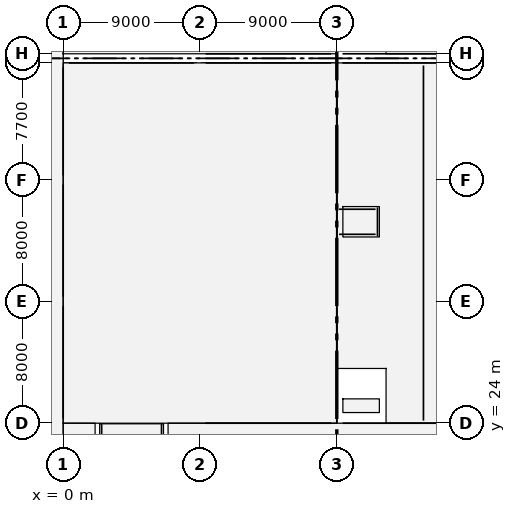
"""IFC4 building model, lengths in metres.
Left out: names, types, materials, properties, quantities, classifications, styles, units other than length and angle.
Written with IfcOpenShell. Run it as: python <this file> out.ifc"""

import sys

from ifc_helpers import new_model, si_unit, direction, frame, frame_2d, origin, origin_2d, place, context, subcontext, project, spatial, rectangle, extrude, element, fill, save


model = new_model("IFC4")
c1 = context("Model", 3, precision=1e-05, world=origin(), true_north=direction((0.0, 1.0)))
c2 = subcontext(c1, "Body", "Model", "MODEL_VIEW")
j1 = project(units=[si_unit("LENGTHUNIT", "METRE"), si_unit("PLANEANGLEUNIT", "RADIAN")], contexts=[c1])
p1 = place(None, origin())
s1 = spatial("IfcSite", under=j1, at=p1, CompositionType="ELEMENT")
p2 = place(p1, origin())
s2 = spatial("IfcBuilding", under=s1, at=p2, CompositionType="ELEMENT")
p3 = place(p2, origin())
s3 = spatial("IfcBuildingStorey", under=s2, at=p3, CompositionType="ELEMENT", Elevation=0.0)
p4 = place(p3, frame((18.0, 24.0, -0.5), z_axis=(0.0, 0.0, 1.0), x_axis=(0.0, 1.0, 0.0)))
e1 = element("IfcWall", 1, at=p4, inside=s3, PredefinedType="SOLIDWALL", context=c2, shape_type="SweptSolid", body=[
    extrude(rectangle(XDim=23.7, YDim=0.3, at=frame_2d((11.85, 0.0))), origin(), (0.0, 0.0, 1.0), 1.725),
])
p5 = place(p3, frame((18.0, 48.3, -0.5), z_axis=(0.0, 0.0, 1.0), x_axis=(0.0, 1.0, 0.0)))
e2 = element("IfcWall", 2, at=p5, inside=s3, PredefinedType="SOLIDWALL", context=c2, shape_type="SweptSolid", body=[
    extrude(rectangle(XDim=47.4, YDim=0.3, at=frame_2d((23.7, 0.0))), origin(), (0.0, 0.0, 1.0), 1.725),
])
for number, where, z_axis, x_axis in (
    (3, (0.0, 24.0, -0.5), (0.0, 0.0, 1.0), (1.0, 0.0, 0.0)),
    (4, (0.0, 32.0, -0.5), (0.0, 0.0, 1.0), (1.0, 0.0, 0.0)),
    (5, (0.0, 40.0, -0.5), (0.0, 0.0, 1.0), (1.0, 0.0, 0.0)),
):
    element("IfcColumn", number, at=place(p3, frame(where, z_axis=z_axis, x_axis=x_axis)), inside=s3, PredefinedType="COLUMN", context=c2, shape_type="SweptSolid", body=[
        extrude(rectangle(XDim=0.7, YDim=0.6, at=origin_2d()), origin(), (0.0, 0.0, 1.0), 7.3),
    ])
for number, where, z_axis, x_axis in (
    (6, (0.0, 47.7, -0.5), (0.0, 0.0, 1.0), (1.0, 0.0, 0.0)),
    (7, (0.0, 48.3, -0.5), (0.0, 0.0, 1.0), (1.0, 0.0, 0.0)),
):
    element("IfcColumn", number, at=place(p3, frame(where, z_axis=z_axis, x_axis=x_axis)), inside=s3, PredefinedType="COLUMN", context=c2, shape_type="SweptSolid", body=[
        extrude(rectangle(XDim=0.75, YDim=0.55, at=origin_2d()), origin(), (0.0, 0.0, 1.0), 7.3),
    ])
for number, where, z_axis, x_axis in (
    (8, (9.0, 24.0, -0.5), (0.0, 0.0, 1.0), (1.0, 0.0, 0.0)),
    (9, (9.0, 32.0, -0.5), (0.0, 0.0, 1.0), (1.0, 0.0, 0.0)),
    (10, (9.0, 40.0, -0.5), (0.0, 0.0, 1.0), (1.0, 0.0, 0.0)),
):
    element("IfcColumn", number, at=place(p3, frame(where, z_axis=z_axis, x_axis=x_axis)), inside=s3, PredefinedType="COLUMN", context=c2, shape_type="SweptSolid", body=[
        extrude(rectangle(XDim=0.7, YDim=0.6, at=origin_2d()), origin(), (0.0, 0.0, 1.0), 7.3),
    ])
for number, where, z_axis, x_axis in (
    (11, (9.0, 47.7, -0.5), (0.0, 0.0, 1.0), (1.0, 0.0, 0.0)),
    (12, (9.0, 48.3, -0.5), (0.0, 0.0, 1.0), (1.0, 0.0, 0.0)),
):
    element("IfcColumn", number, at=place(p3, frame(where, z_axis=z_axis, x_axis=x_axis)), inside=s3, PredefinedType="COLUMN", context=c2, shape_type="SweptSolid", body=[
        extrude(rectangle(XDim=0.75, YDim=0.55, at=origin_2d()), origin(), (0.0, 0.0, 1.0), 7.3),
    ])
for number, where, z_axis, x_axis in (
    (13, (18.0, 24.0, -0.5), (0.0, 0.0, 1.0), (1.0, 0.0, 0.0)),
    (14, (18.0, 32.0, -0.5), (0.0, 0.0, 1.0), (1.0, 0.0, 0.0)),
    (15, (18.0, 40.0, -0.5), (0.0, 0.0, 1.0), (1.0, 0.0, 0.0)),
):
    element("IfcColumn", number, at=place(p3, frame(where, z_axis=z_axis, x_axis=x_axis)), inside=s3, PredefinedType="COLUMN", context=c2, shape_type="SweptSolid", body=[
        extrude(rectangle(XDim=0.75, YDim=0.75, at=origin_2d()), origin(), (0.0, 0.0, 1.0), 6.8),
    ])
for number, where, z_axis, x_axis in (
    (16, (18.0, 47.7, -0.5), (0.0, 0.0, 1.0), (1.0, 0.0, 0.0)),
    (17, (18.0, 48.3, -0.5), (0.0, 0.0, 1.0), (1.0, 0.0, 0.0)),
):
    element("IfcColumn", number, at=place(p3, frame(where, z_axis=z_axis, x_axis=x_axis)), inside=s3, PredefinedType="COLUMN", context=c2, shape_type="SweptSolid", body=[
        extrude(rectangle(XDim=0.75, YDim=0.55, at=origin_2d()), origin(), (0.0, 0.0, 1.0), 6.8),
    ])
p6 = place(p3, frame((9.35, 24.0, 1.225), z_axis=(0.0, 0.0, 1.0), x_axis=(1.0, 0.0, 0.0)))
e18 = element("IfcWall", 18, at=p6, inside=s3, PredefinedType="SOLIDWALL", context=c2, shape_type="SweptSolid", body=[
    extrude(rectangle(XDim=8.275, YDim=0.32, at=frame_2d((4.137, 0.0))), origin(), (0.0, 0.0, 1.0), 3.875),
])
p7 = place(p6, frame((1.858, 0.0, 0.685)))
e19 = element("IfcOpeningElement", 19, at=p7, cuts=e18, PredefinedType="OPENING", context=c2, shape_type="SweptSolid", body=[
    extrude(rectangle(XDim=1.8, YDim=3.15, at=frame_2d((0.9, 1.575))), frame((0.0, 0.17, 0.0), z_axis=(0.0, -1.0, 0.0), x_axis=(1.0, 0.0, 0.0)), (0.0, 0.0, 1.0), 0.34),
])
p8 = place(p6, frame((4.617, 0.0, 0.685)))
e20 = element("IfcOpeningElement", 20, at=p8, cuts=e18, PredefinedType="OPENING", context=c2, shape_type="SweptSolid", body=[
    extrude(rectangle(XDim=1.8, YDim=3.15, at=frame_2d((0.9, 1.575))), frame((0.0, 0.17, 0.0), z_axis=(0.0, -1.0, 0.0), x_axis=(1.0, 0.0, 0.0)), (0.0, 0.0, 1.0), 0.34),
])
p9 = place(p3, frame((0.375, 47.7, 1.225), z_axis=(0.0, 0.0, 1.0), x_axis=(1.0, 0.0, 0.0)))
e21 = element("IfcWall", 21, at=p9, inside=s3, PredefinedType="SOLIDWALL", context=c2, shape_type="SweptSolid", body=[
    extrude(rectangle(XDim=8.25, YDim=0.32, at=frame_2d((4.125, 0.0))), origin(), (0.0, 0.0, 1.0), 4.515),
])
p10 = place(p9, frame((1.85, 0.0, 0.85)))
e22 = element("IfcOpeningElement", 22, at=p10, cuts=e21, PredefinedType="OPENING", context=c2, shape_type="SweptSolid", body=[
    extrude(rectangle(XDim=1.8, YDim=3.15, at=frame_2d((0.9, 1.575))), frame((0.0, 0.17, 0.0), z_axis=(0.0, -1.0, 0.0), x_axis=(1.0, 0.0, 0.0)), (0.0, 0.0, 1.0), 0.34),
])
p11 = place(p9, frame((4.6, 0.0, 0.85)))
e23 = element("IfcOpeningElement", 23, at=p11, cuts=e21, PredefinedType="OPENING", context=c2, shape_type="SweptSolid", body=[
    extrude(rectangle(XDim=1.8, YDim=3.15, at=frame_2d((0.9, 1.575))), frame((0.0, 0.17, 0.0), z_axis=(0.0, -1.0, 0.0), x_axis=(1.0, 0.0, 0.0)), (0.0, 0.0, 1.0), 0.34),
])
p12 = place(p3, frame((9.375, 47.7, 1.225), z_axis=(0.0, 0.0, 1.0), x_axis=(1.0, 0.0, 0.0)))
e24 = element("IfcWall", 24, at=p12, inside=s3, PredefinedType="SOLIDWALL", context=c2, shape_type="SweptSolid", body=[
    extrude(rectangle(XDim=8.25, YDim=0.32, at=frame_2d((4.125, 0.0))), origin(), (0.0, 0.0, 1.0), 3.875),
])
p13 = place(p12, frame((1.85, 0.0, 0.685)))
e25 = element("IfcOpeningElement", 25, at=p13, cuts=e24, PredefinedType="OPENING", context=c2, shape_type="SweptSolid", body=[
    extrude(rectangle(XDim=1.8, YDim=3.15, at=frame_2d((0.9, 1.575))), frame((0.0, 0.17, 0.0), z_axis=(0.0, -1.0, 0.0), x_axis=(1.0, 0.0, 0.0)), (0.0, 0.0, 1.0), 0.34),
])
p14 = place(p12, frame((4.6, 0.0, 0.685)))
e26 = element("IfcOpeningElement", 26, at=p14, cuts=e24, PredefinedType="OPENING", context=c2, shape_type="SweptSolid", body=[
    extrude(rectangle(XDim=1.8, YDim=3.15, at=frame_2d((0.9, 1.575))), frame((0.0, 0.17, 0.0), z_axis=(0.0, -1.0, 0.0), x_axis=(1.0, 0.0, 0.0)), (0.0, 0.0, 1.0), 0.34),
])
p15 = place(p3, frame((0.0, 24.3, 1.225), z_axis=(0.0, 0.0, 1.0), x_axis=(0.0, 1.0, 0.0)))
e27 = element("IfcWall", 27, at=p15, inside=s3, PredefinedType="SOLIDWALL", context=c2, shape_type="SweptSolid", body=[
    extrude(rectangle(XDim=7.4, YDim=0.32, at=frame_2d((3.7, 0.0))), origin(), (0.0, 0.0, 1.0), 4.515),
])
p16 = place(p15, frame((1.184, 0.0, 0.0)))
e28 = element("IfcOpeningElement", 28, at=p16, cuts=e27, PredefinedType="OPENING", context=c2, shape_type="SweptSolid", body=[
    extrude(rectangle(XDim=3.2, YDim=3.6, at=frame_2d((1.6, 1.8))), frame((0.0, 0.17, 0.0), z_axis=(0.0, -1.0, 0.0), x_axis=(1.0, 0.0, 0.0)), (0.0, 0.0, 1.0), 0.34),
])
p17 = place(p3, frame((0.0, 32.3, 1.225), z_axis=(0.0, 0.0, 1.0), x_axis=(0.0, 1.0, 0.0)))
e29 = element("IfcWall", 29, at=p17, inside=s3, PredefinedType="SOLIDWALL", context=c2, shape_type="SweptSolid", body=[
    extrude(rectangle(XDim=7.4, YDim=0.32, at=frame_2d((3.7, 0.0))), origin(), (0.0, 0.0, 1.0), 4.515),
])
p18 = place(p17, frame((1.184, 0.0, 0.0)))
e30 = element("IfcOpeningElement", 30, at=p18, cuts=e29, PredefinedType="OPENING", context=c2, shape_type="SweptSolid", body=[
    extrude(rectangle(XDim=3.2, YDim=3.6, at=frame_2d((1.6, 1.8))), frame((0.0, 0.17, 0.0), z_axis=(0.0, -1.0, 0.0), x_axis=(1.0, 0.0, 0.0)), (0.0, 0.0, 1.0), 0.34),
])
p19 = place(p3, frame((0.0, 40.3, 1.225), z_axis=(0.0, 0.0, 1.0), x_axis=(0.0, 1.0, 0.0)))
e31 = element("IfcWall", 31, at=p19, inside=s3, PredefinedType="SOLIDWALL", context=c2, shape_type="SweptSolid", body=[
    extrude(rectangle(XDim=7.125, YDim=0.32, at=frame_2d((3.562, 0.0))), origin(), (0.0, 0.0, 1.0), 4.515),
])
p20 = place(p19, frame((1.14, 0.0, 0.0)))
e32 = element("IfcOpeningElement", 32, at=p20, cuts=e31, PredefinedType="OPENING", context=c2, shape_type="SweptSolid", body=[
    extrude(rectangle(XDim=3.2, YDim=3.6, at=frame_2d((1.6, 1.8))), frame((0.0, 0.17, 0.0), z_axis=(0.0, -1.0, 0.0), x_axis=(1.0, 0.0, 0.0)), (0.0, 0.0, 1.0), 0.34),
])
p21 = place(p3, frame((9.375, 48.3, 1.225), z_axis=(0.0, 0.0, 1.0), x_axis=(1.0, 0.0, 0.0)))
e33 = element("IfcWall", 33, at=p21, inside=s3, PredefinedType="SOLIDWALL", context=c2, shape_type="SweptSolid", body=[
    extrude(rectangle(XDim=8.25, YDim=0.32, at=frame_2d((4.125, 0.0))), origin(), (0.0, 0.0, 1.0), 3.875),
])
p22 = place(p21, frame((1.85, 0.0, 0.685)))
e34 = element("IfcOpeningElement", 34, at=p22, cuts=e33, PredefinedType="OPENING", context=c2, shape_type="SweptSolid", body=[
    extrude(rectangle(XDim=1.8, YDim=3.15, at=frame_2d((0.9, 1.575))), frame((0.0, 0.17, 0.0), z_axis=(0.0, -1.0, 0.0), x_axis=(1.0, 0.0, 0.0)), (0.0, 0.0, 1.0), 0.34),
])
p23 = place(p21, frame((4.6, 0.0, 0.685)))
e35 = element("IfcOpeningElement", 35, at=p23, cuts=e33, PredefinedType="OPENING", context=c2, shape_type="SweptSolid", body=[
    extrude(rectangle(XDim=1.8, YDim=3.15, at=frame_2d((0.9, 1.575))), frame((0.0, 0.17, 0.0), z_axis=(0.0, -1.0, 0.0), x_axis=(1.0, 0.0, 0.0)), (0.0, 0.0, 1.0), 0.34),
])
for number, where, z_axis, x_axis in (
    (36, (18.375, 24.0, 0.0), (0.0, 0.0, 1.0), (1.0, 0.0, 0.0)),
    (37, (18.375, 47.7, 0.0), (0.0, 0.0, 1.0), (1.0, 0.0, 0.0)),
):
    element("IfcWall", number, at=place(p3, frame(where, z_axis=z_axis, x_axis=x_axis)), inside=s3, PredefinedType="SOLIDWALL", context=c2, shape_type="SweptSolid", body=[
        extrude(rectangle(XDim=8.25, YDim=0.38, at=frame_2d((4.125, 0.0))), origin(), (0.0, 0.0, 1.0), 5.08),
    ])
p24 = place(p3, frame((18.375, 48.3, 0.0), z_axis=(0.0, 0.0, 1.0), x_axis=(1.0, 0.0, 0.0)))
e38 = element("IfcWall", 38, at=p24, inside=s3, PredefinedType="SOLIDWALL", context=c2, shape_type="SweptSolid", body=[
    extrude(rectangle(XDim=8.25, YDim=0.38, at=frame_2d((4.125, 0.0))), origin(), (0.0, 0.0, 1.0), 5.08),
])
p25 = place(p24, frame((3.325, 0.0, 3.59)))
e39 = element("IfcOpeningElement", 39, at=p25, cuts=e38, PredefinedType="OPENING", context=c2, shape_type="SweptSolid", body=[
    extrude(rectangle(XDim=1.6, YDim=1.45, at=frame_2d((0.8, 0.725))), frame((0.0, 0.2, 0.0), z_axis=(0.0, -1.0, 0.0), x_axis=(1.0, 0.0, 0.0)), (0.0, 0.0, 1.0), 0.4),
])
p26 = place(p3, frame((20.675, 36.3, 0.0), z_axis=(0.0, 0.0, 1.0), x_axis=(0.0, 1.0, 0.0)))
e40 = element("IfcWall", 40, at=p26, inside=s3, PredefinedType="SOLIDWALL", context=c2, shape_type="SweptSolid", body=[
    extrude(rectangle(XDim=1.9, YDim=0.25, at=frame_2d((0.95, 0.0))), origin(), (0.0, 0.0, 1.0), 0.025),
])
for number, where, z_axis, x_axis in (
    (41, (18.15, 36.425, 0.0), (0.0, 0.0, 1.0), (1.0, 0.0, 0.0)),
    (42, (18.15, 38.075, 0.0), (0.0, 0.0, 1.0), (1.0, 0.0, 0.0)),
):
    element("IfcWall", number, at=place(p3, frame(where, z_axis=z_axis, x_axis=x_axis)), inside=s3, PredefinedType="SOLIDWALL", context=c2, shape_type="SweptSolid", body=[
        extrude(rectangle(XDim=2.4, YDim=0.25, at=frame_2d((1.2, 0.0))), origin(), (0.0, 0.0, 1.0), 0.025),
    ])
for number, where, z_axis, x_axis in (
    (43, (2.53, 15.625, -0.5), (0.0, 0.0, 1.0), (0.0, 1.0, 0.0)),
    (44, (6.47, 15.625, -0.5), (0.0, 0.0, 1.0), (0.0, 1.0, 0.0)),
):
    element("IfcWall", number, at=place(p3, frame(where, z_axis=z_axis, x_axis=x_axis)), inside=s3, PredefinedType="SOLIDWALL", context=c2, shape_type="SweptSolid", body=[
        extrude(rectangle(XDim=8.315, YDim=0.25, at=frame_2d((4.157, 0.0))), origin(), (0.0, 0.0, 1.0), 1.65),
    ])
p27 = place(p3, frame((18.0, 24.42, 1.225), z_axis=(0.0, 0.0, 1.0), x_axis=(0.0, 1.0, 0.0)))
e45 = element("IfcWall", 45, at=p27, inside=s3, PredefinedType="STANDARD", context=c2, shape_type="SweptSolid", body=[
    extrude(rectangle(XDim=7.16, YDim=0.255, at=frame_2d((3.58, 0.0))), origin(), (0.0, 0.0, 1.0), 4.105),
])
p28 = place(p3, frame((18.0, 32.42, 1.225), z_axis=(0.0, 0.0, 1.0), x_axis=(0.0, 1.0, 0.0)))
e46 = element("IfcWall", 46, at=p28, inside=s3, PredefinedType="STANDARD", context=c2, shape_type="SweptSolid", body=[
    extrude(rectangle(XDim=7.16, YDim=0.255, at=frame_2d((3.58, 0.0))), origin(), (0.0, 0.0, 1.0), 4.105),
])
p29 = place(p28, frame((3.43, 0.0, 0.0)))
e47 = element("IfcOpeningElement", 47, at=p29, cuts=e46, PredefinedType="OPENING", context=c2, shape_type="SweptSolid", body=[
    extrude(rectangle(XDim=1.8, YDim=2.3, at=frame_2d((0.9, 1.15))), frame((0.0, 0.137, 0.0), z_axis=(0.0, -1.0, 0.0), x_axis=(1.0, 0.0, 0.0)), (0.0, 0.0, 1.0), 0.275),
])
p30 = place(p3, frame((18.0, 40.42, 1.225), z_axis=(0.0, 0.0, 1.0), x_axis=(0.0, 1.0, 0.0)))
e48 = element("IfcWall", 48, at=p30, inside=s3, PredefinedType="STANDARD", context=c2, shape_type="SweptSolid", body=[
    extrude(rectangle(XDim=6.86, YDim=0.255, at=frame_2d((3.43, 0.0))), origin(), (0.0, 0.0, 1.0), 4.105),
])
p31 = place(p3, frame((23.7, 24.17, 0.0), z_axis=(0.0, 0.0, 1.0), x_axis=(0.0, 1.0, 0.0)))
e49 = element("IfcWall", 49, at=p31, inside=s3, PredefinedType="PARTITIONING", context=c2, shape_type="SweptSolid", body=[
    extrude(rectangle(XDim=23.36, YDim=0.14, at=frame_2d((11.68, 0.0))), origin(), (0.0, 0.0, 1.0), 5.95),
])
p32 = place(p31, frame((11.33, 0.0, 0.0)))
e50 = element("IfcOpeningElement", 50, at=p32, cuts=e49, PredefinedType="OPENING", context=c2, shape_type="SweptSolid", body=[
    extrude(rectangle(XDim=1.0, YDim=2.15, at=frame_2d((0.5, 1.075))), frame((0.0, 0.08, 0.0), z_axis=(0.0, -1.0, 0.0), x_axis=(1.0, 0.0, 0.0)), (0.0, 0.0, 1.0), 0.16),
])
p33 = place(p7, origin())
e51 = element("IfcWindow", 51, at=p33, inside=s3, PartitioningType="DOUBLE_PANEL_VERTICAL", PredefinedType="WINDOW", context=c2, shape_type="SweptSolid", body=[
    extrude(rectangle(XDim=1.8, YDim=3.15, at=frame_2d((0.9, 1.575))), frame((0.0, 0.03, 0.0), z_axis=(0.0, -1.0, 0.0), x_axis=(1.0, 0.0, 0.0)), (0.0, 0.0, 1.0), 0.06),
])
fill(e19, e51)
p34 = place(p8, origin())
e52 = element("IfcWindow", 52, at=p34, inside=s3, PartitioningType="DOUBLE_PANEL_VERTICAL", PredefinedType="WINDOW", context=c2, shape_type="SweptSolid", body=[
    extrude(rectangle(XDim=1.8, YDim=3.15, at=frame_2d((0.9, 1.575))), frame((0.0, 0.03, 0.0), z_axis=(0.0, -1.0, 0.0), x_axis=(1.0, 0.0, 0.0)), (0.0, 0.0, 1.0), 0.06),
])
fill(e20, e52)
p35 = place(p10, origin())
e53 = element("IfcWindow", 53, at=p35, inside=s3, PartitioningType="DOUBLE_PANEL_VERTICAL", PredefinedType="WINDOW", context=c2, shape_type="SweptSolid", body=[
    extrude(rectangle(XDim=1.8, YDim=3.15, at=frame_2d((0.9, 1.575))), frame((0.0, 0.03, 0.0), z_axis=(0.0, -1.0, 0.0), x_axis=(1.0, 0.0, 0.0)), (0.0, 0.0, 1.0), 0.06),
])
fill(e22, e53)
p36 = place(p11, origin())
e54 = element("IfcWindow", 54, at=p36, inside=s3, PartitioningType="DOUBLE_PANEL_VERTICAL", PredefinedType="WINDOW", context=c2, shape_type="SweptSolid", body=[
    extrude(rectangle(XDim=1.8, YDim=3.15, at=frame_2d((0.9, 1.575))), frame((0.0, 0.03, 0.0), z_axis=(0.0, -1.0, 0.0), x_axis=(1.0, 0.0, 0.0)), (0.0, 0.0, 1.0), 0.06),
])
fill(e23, e54)
p37 = place(p13, origin())
e55 = element("IfcWindow", 55, at=p37, inside=s3, PartitioningType="DOUBLE_PANEL_VERTICAL", PredefinedType="WINDOW", context=c2, shape_type="SweptSolid", body=[
    extrude(rectangle(XDim=1.8, YDim=3.15, at=frame_2d((0.9, 1.575))), frame((0.0, 0.03, 0.0), z_axis=(0.0, -1.0, 0.0), x_axis=(1.0, 0.0, 0.0)), (0.0, 0.0, 1.0), 0.06),
])
fill(e25, e55)
p38 = place(p14, origin())
e56 = element("IfcWindow", 56, at=p38, inside=s3, PartitioningType="DOUBLE_PANEL_VERTICAL", PredefinedType="WINDOW", context=c2, shape_type="SweptSolid", body=[
    extrude(rectangle(XDim=1.8, YDim=3.15, at=frame_2d((0.9, 1.575))), frame((0.0, 0.03, 0.0), z_axis=(0.0, -1.0, 0.0), x_axis=(1.0, 0.0, 0.0)), (0.0, 0.0, 1.0), 0.06),
])
fill(e26, e56)
p39 = place(p16, origin())
e57 = element("IfcDoor", 57, at=p39, inside=s3, OperationType="ROLLINGUP", PredefinedType="GATE", context=c2, shape_type="SweptSolid", body=[
    extrude(rectangle(XDim=3.2, YDim=3.6, at=frame_2d((1.6, 1.8))), frame((0.0, 0.025, 0.0), z_axis=(0.0, -1.0, 0.0), x_axis=(1.0, 0.0, 0.0)), (0.0, 0.0, 1.0), 0.05),
])
fill(e28, e57)
p40 = place(p18, origin())
e58 = element("IfcDoor", 58, at=p40, inside=s3, OperationType="ROLLINGUP", PredefinedType="GATE", context=c2, shape_type="SweptSolid", body=[
    extrude(rectangle(XDim=3.2, YDim=3.6, at=frame_2d((1.6, 1.8))), frame((0.0, 0.025, 0.0), z_axis=(0.0, -1.0, 0.0), x_axis=(1.0, 0.0, 0.0)), (0.0, 0.0, 1.0), 0.05),
])
fill(e30, e58)
p41 = place(p20, origin())
e59 = element("IfcDoor", 59, at=p41, inside=s3, OperationType="ROLLINGUP", PredefinedType="GATE", context=c2, shape_type="SweptSolid", body=[
    extrude(rectangle(XDim=3.2, YDim=3.6, at=frame_2d((1.6, 1.8))), frame((0.0, 0.025, 0.0), z_axis=(0.0, -1.0, 0.0), x_axis=(1.0, 0.0, 0.0)), (0.0, 0.0, 1.0), 0.05),
])
fill(e32, e59)
p42 = place(p22, origin())
e60 = element("IfcWindow", 60, at=p42, inside=s3, PartitioningType="DOUBLE_PANEL_VERTICAL", PredefinedType="WINDOW", context=c2, shape_type="SweptSolid", body=[
    extrude(rectangle(XDim=1.8, YDim=3.15, at=frame_2d((0.9, 1.575))), frame((0.0, 0.03, 0.0), z_axis=(0.0, -1.0, 0.0), x_axis=(1.0, 0.0, 0.0)), (0.0, 0.0, 1.0), 0.06),
])
fill(e34, e60)
p43 = place(p23, origin())
e61 = element("IfcWindow", 61, at=p43, inside=s3, PartitioningType="DOUBLE_PANEL_VERTICAL", PredefinedType="WINDOW", context=c2, shape_type="SweptSolid", body=[
    extrude(rectangle(XDim=1.8, YDim=3.15, at=frame_2d((0.9, 1.575))), frame((0.0, 0.03, 0.0), z_axis=(0.0, -1.0, 0.0), x_axis=(1.0, 0.0, 0.0)), (0.0, 0.0, 1.0), 0.06),
])
fill(e35, e61)
p44 = place(p25, origin())
e62 = element("IfcWindow", 62, at=p44, inside=s3, PartitioningType="DOUBLE_PANEL_HORIZONTAL", PredefinedType="WINDOW", context=c2, shape_type="SweptSolid", body=[
    extrude(rectangle(XDim=1.6, YDim=1.45, at=frame_2d((0.8, 0.725))), frame((0.0, 0.03, 0.0), z_axis=(0.0, -1.0, 0.0), x_axis=(1.0, 0.0, 0.0)), (0.0, 0.0, 1.0), 0.06),
])
fill(e39, e62)
p45 = place(p29, origin())
e63 = element("IfcDoor", 63, at=p45, inside=s3, OperationType="SINGLE_SWING_LEFT", PredefinedType="DOOR", context=c2, shape_type="SweptSolid", body=[
    extrude(rectangle(XDim=1.8, YDim=2.3, at=frame_2d((0.9, 1.15))), frame((0.0, 0.025, 0.0), z_axis=(0.0, -1.0, 0.0), x_axis=(1.0, 0.0, 0.0)), (0.0, 0.0, 1.0), 0.05),
])
fill(e47, e63)
p46 = place(p32, origin())
e64 = element("IfcDoor", 64, at=p46, inside=s3, OperationType="SINGLE_SWING_RIGHT", PredefinedType="DOOR", context=c2, shape_type="SweptSolid", body=[
    extrude(rectangle(XDim=1.0, YDim=2.15, at=frame_2d((0.5, 1.075))), frame((0.0, 0.025, 0.0), z_axis=(0.0, -1.0, 0.0), x_axis=(1.0, 0.0, 0.0)), (0.0, 0.0, 1.0), 0.05),
])
fill(e50, e64)
save(model, sys.argv[1])
